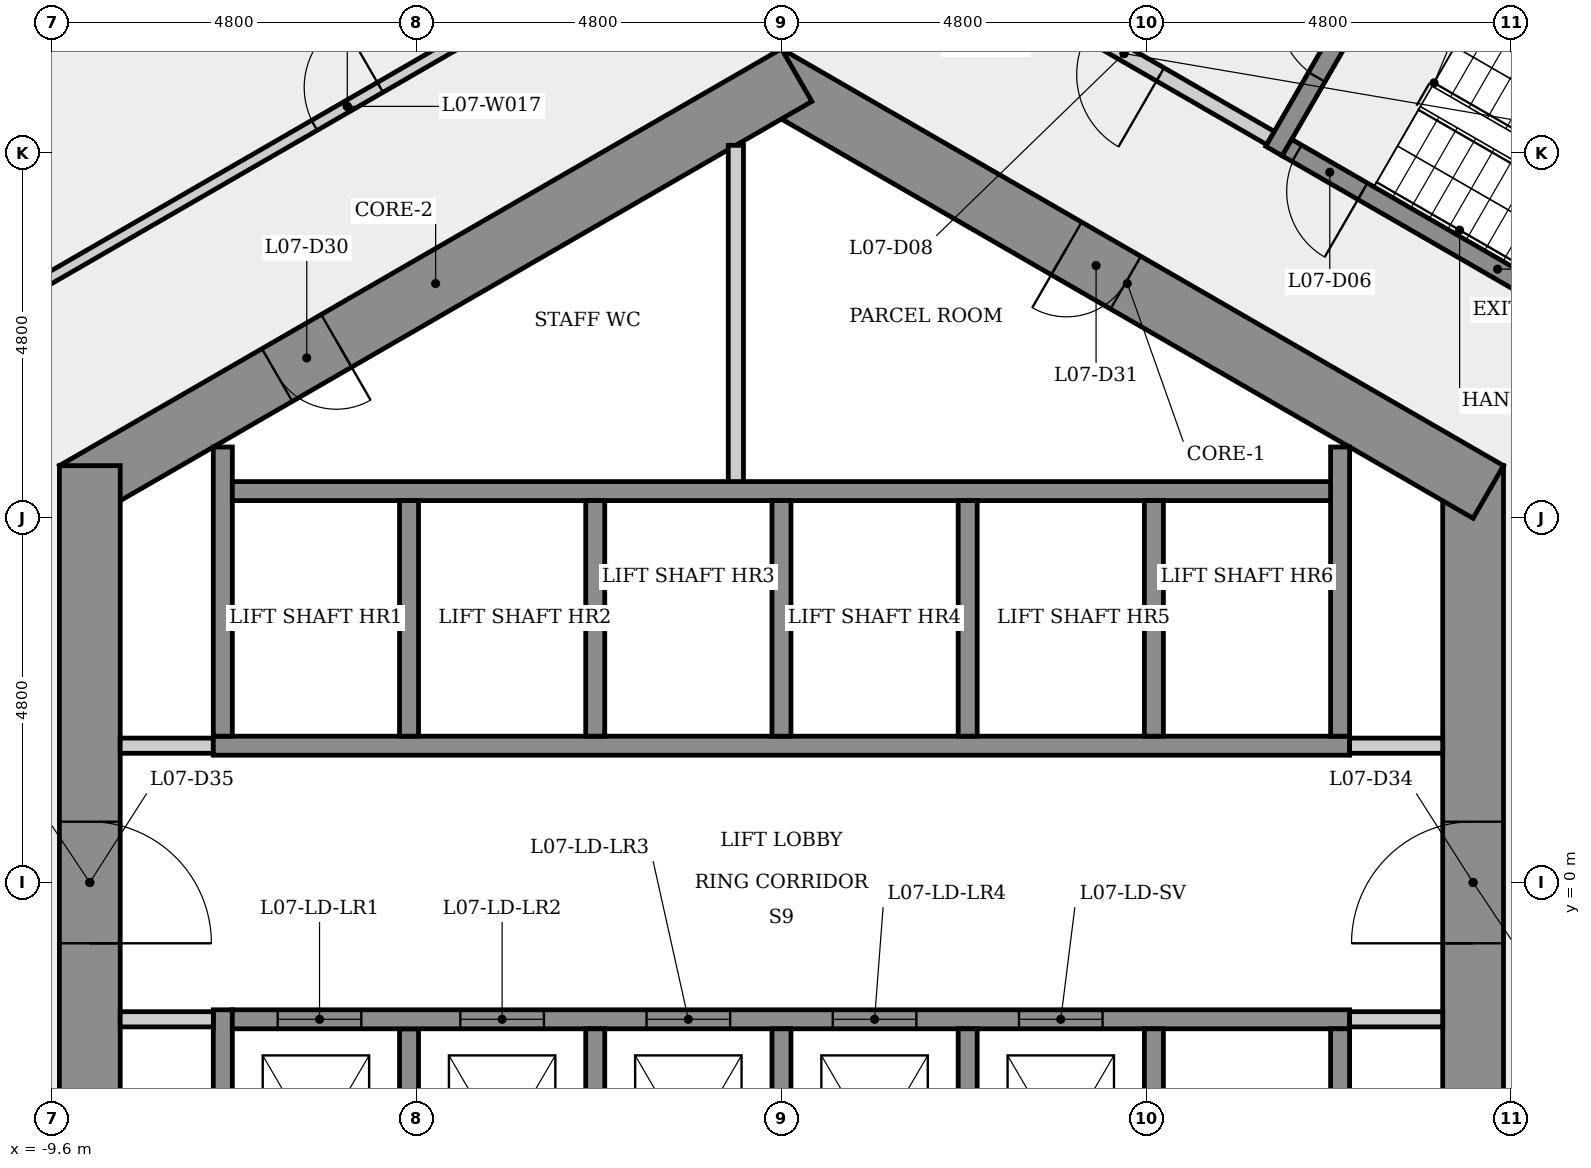
"""IFC4 building model, lengths in metres.
Left out: names, types, materials, properties, quantities, classifications, styles, units other than length and angle.
Written with IfcOpenShell. Run it as: python <this file> out.ifc"""

import sys

from ifc_helpers import new_model, si_unit, direction, frame, frame_2d, origin, place, context, subcontext, project, spatial, rectangle, extrude, element, fill, save


model = new_model("IFC4")
c1 = context("Model", 3, precision=1e-05, world=origin(), true_north=direction((0.0, 1.0)))
c2 = subcontext(c1, "Body", "Model", "MODEL_VIEW")
j1 = project(units=[si_unit("LENGTHUNIT", "METRE"), si_unit("PLANEANGLEUNIT", "RADIAN")], contexts=[c1])
p1 = place(None, origin())
s1 = spatial("IfcSite", under=j1, at=p1, CompositionType="ELEMENT")
p2 = place(p1, origin())
s2 = spatial("IfcBuilding", under=s1, at=p2, CompositionType="ELEMENT")
p3 = place(p2, frame((0.0, 0.0, 32.3)))
s3 = spatial("IfcBuildingStorey", under=s2, at=p3, CompositionType="ELEMENT", Elevation=32.3)
p4 = place(p3, frame((9.1, -5.485, 0.0), z_axis=(0.0, 0.0, 1.0), x_axis=(0.0, 1.0, 0.0)))
e1 = element("IfcWall", 1, at=p4, inside=s3, PredefinedType="SHEAR", context=c2, shape_type="SweptSolid", body=[
    extrude(rectangle(XDim=10.97, YDim=0.8, at=frame_2d((5.485, 0.0))), origin(), (0.0, 0.0, 1.0), 3.4),
])
p5 = place(p4, frame((4.685, 0.0, 0.0)))
e2 = element("IfcOpeningElement", 2, at=p5, cuts=e1, PredefinedType="OPENING", context=c2, shape_type="SweptSolid", body=[
    extrude(rectangle(XDim=1.6, YDim=2.1, at=frame_2d((0.8, 1.05))), frame((0.0, 0.41, 0.0), z_axis=(0.0, -1.0, 0.0), x_axis=(1.0, 0.0, 0.0)), (0.0, 0.0, 1.0), 0.82),
])
p6 = place(p3, frame((9.3, 5.138, 0.0), z_axis=(0.0, 0.0, 1.0), x_axis=(-0.866023993627, 0.500002442456, 0.0)))
e3 = element("IfcWall", 3, at=p6, inside=s3, PredefinedType="SHEAR", context=c2, shape_type="SweptSolid", body=[
    extrude(rectangle(XDim=10.97, YDim=0.8, at=frame_2d((5.485, 0.0))), origin(), (0.0, 0.0, 1.0), 3.4),
])
p7 = place(p6, frame((5.509, 0.0, 0.0)))
e4 = element("IfcOpeningElement", 4, at=p7, cuts=e3, PredefinedType="OPENING", context=c2, shape_type="SweptSolid", body=[
    extrude(rectangle(XDim=0.9, YDim=2.1, at=frame_2d((0.45, 1.05))), frame((0.0, 0.41, 0.0), z_axis=(0.0, -1.0, 0.0), x_axis=(1.0, 0.0, 0.0)), (0.0, 0.0, 1.0), 0.82),
])
p8 = place(p3, frame((0.2, 10.623, 0.0), z_axis=(0.0, 0.0, 1.0), x_axis=(-0.866023993627, -0.500002442456, 0.0)))
e5 = element("IfcWall", 5, at=p8, inside=s3, PredefinedType="SHEAR", context=c2, shape_type="SweptSolid", body=[
    extrude(rectangle(XDim=10.97, YDim=0.8, at=frame_2d((5.485, 0.0))), origin(), (0.0, 0.0, 1.0), 3.4),
])
p9 = place(p8, frame((6.993, 0.0, 0.0)))
e6 = element("IfcOpeningElement", 6, at=p9, cuts=e5, PredefinedType="OPENING", context=c2, shape_type="SweptSolid", body=[
    extrude(rectangle(XDim=0.9, YDim=2.1, at=frame_2d((0.45, 1.05))), frame((0.0, 0.41, 0.0), z_axis=(0.0, -1.0, 0.0), x_axis=(1.0, 0.0, 0.0)), (0.0, 0.0, 1.0), 0.82),
])
p10 = place(p3, frame((-9.1, 5.485, 0.0), z_axis=(0.0, 0.0, 1.0), x_axis=(0.0, -1.0, 0.0)))
e7 = element("IfcWall", 7, at=p10, inside=s3, PredefinedType="SHEAR", context=c2, shape_type="SweptSolid", body=[
    extrude(rectangle(XDim=10.97, YDim=0.8, at=frame_2d((5.485, 0.0))), origin(), (0.0, 0.0, 1.0), 3.4),
])
p11 = place(p10, frame((4.685, 0.0, 0.0)))
e8 = element("IfcOpeningElement", 8, at=p11, cuts=e7, PredefinedType="OPENING", context=c2, shape_type="SweptSolid", body=[
    extrude(rectangle(XDim=1.6, YDim=2.1, at=frame_2d((0.8, 1.05))), frame((0.0, 0.41, 0.0), z_axis=(0.0, -1.0, 0.0), x_axis=(1.0, 0.0, 0.0)), (0.0, 0.0, 1.0), 0.82),
])
p12 = place(p3, frame((-10.825, 7.26, 0.0), z_axis=(0.0, 0.0, 1.0), x_axis=(0.866025463095, 0.499999897272, 0.0)))
e9 = element("IfcWall", 9, at=p12, inside=s3, PredefinedType="PARTITIONING", context=c2, shape_type="SweptSolid", body=[
    extrude(rectangle(XDim=11.807, YDim=0.15, at=frame_2d((5.903, 0.0))), origin(), (0.0, 0.0, 1.0), 3.05),
])
p13 = place(p12, frame((5.403, 0.0, 0.0)))
e10 = element("IfcOpeningElement", 10, at=p13, cuts=e9, PredefinedType="OPENING", context=c2, shape_type="SweptSolid", body=[
    extrude(rectangle(XDim=1.0, YDim=2.1, at=frame_2d((0.5, 1.05))), frame((0.0, 0.085, 0.0), z_axis=(0.0, -1.0, 0.0), x_axis=(1.0, 0.0, 0.0)), (0.0, 0.0, 1.0), 0.17),
])
p14 = place(p3, frame((-8.7, 1.8, 0.0), z_axis=(0.0, 0.0, 1.0), x_axis=(1.0, 0.0, 0.0)))
e11 = element("IfcWall", 11, at=p14, inside=s3, PredefinedType="PARTITIONING", context=c2, shape_type="SweptSolid", body=[
    extrude(rectangle(XDim=1.225, YDim=0.2, at=frame_2d((0.613, 0.0))), origin(), (0.0, 0.0, 1.0), 3.05),
])
p15 = place(p3, frame((-7.475, 1.8, 0.0), z_axis=(0.0, 0.0, 1.0), x_axis=(1.0, 0.0, 0.0)))
e12 = element("IfcWall", 12, at=p15, inside=s3, PredefinedType="SHEAR", context=c2, shape_type="SweptSolid", body=[
    extrude(rectangle(XDim=14.95, YDim=0.25, at=frame_2d((7.475, 0.0))), origin(), (0.0, 0.0, 1.0), 3.05),
])
p16 = place(p3, frame((-7.35, -5.73, 0.0), z_axis=(0.0, 0.0, 1.0), x_axis=(0.0, 1.0, 0.0)))
e13 = element("IfcWall", 13, at=p16, inside=s3, PredefinedType="SHEAR", context=c2, shape_type="SweptSolid", body=[
    extrude(rectangle(XDim=4.055, YDim=0.25, at=frame_2d((2.028, 0.0))), origin(), (0.0, 0.0, 1.0), 3.05),
])
p17 = place(p3, frame((-7.35, 1.925, 0.0), z_axis=(0.0, 0.0, 1.0), x_axis=(0.0, 1.0, 0.0)))
e14 = element("IfcWall", 14, at=p17, inside=s3, PredefinedType="SHEAR", context=c2, shape_type="SweptSolid", body=[
    extrude(rectangle(XDim=3.805, YDim=0.25, at=frame_2d((1.903, 0.0))), origin(), (0.0, 0.0, 1.0), 3.05),
])
p18 = place(p3, frame((-7.225, 5.15, 0.0), z_axis=(0.0, 0.0, 1.0), x_axis=(1.0, 0.0, 0.0)))
e15 = element("IfcWall", 15, at=p18, inside=s3, PredefinedType="SHEAR", context=c2, shape_type="SweptSolid", body=[
    extrude(rectangle(XDim=14.7, YDim=0.25, at=frame_2d((7.35, 0.0))), origin(), (0.0, 0.0, 1.0), 3.05),
])
p19 = place(p3, frame((-7.475, -1.8, 0.0), z_axis=(0.0, 0.0, 1.0), x_axis=(-1.0, 0.0, 0.0)))
e16 = element("IfcWall", 16, at=p19, inside=s3, PredefinedType="PARTITIONING", context=c2, shape_type="SweptSolid", body=[
    extrude(rectangle(XDim=1.225, YDim=0.2, at=frame_2d((0.613, 0.0))), origin(), (0.0, 0.0, 1.0), 3.05),
])
for number, where, z_axis, x_axis in (
    (17, (-4.9, -1.925, 0.0), (0.0, 0.0, 1.0), (0.0, -1.0, 0.0)),
    (18, (-4.9, 5.025, 0.0), (0.0, 0.0, 1.0), (0.0, -1.0, 0.0)),
):
    element("IfcWall", number, at=place(p3, frame(where, z_axis=z_axis, x_axis=x_axis)), inside=s3, PredefinedType="SHEAR", context=c2, shape_type="SweptSolid", body=[
        extrude(rectangle(XDim=3.1, YDim=0.25, at=frame_2d((1.55, 0.0))), origin(), (0.0, 0.0, 1.0), 3.4),
    ])
p20 = place(p3, frame((-7.225, -1.8, 0.0), z_axis=(0.0, 0.0, 1.0), x_axis=(1.0, 0.0, 0.0)))
e19 = element("IfcWall", 19, at=p20, inside=s3, PredefinedType="SHEAR", context=c2, shape_type="SweptSolid", body=[
    extrude(rectangle(XDim=14.7, YDim=0.25, at=frame_2d((7.35, 0.0))), origin(), (0.0, 0.0, 1.0), 3.05),
])
p21 = place(p20, frame((0.597, 0.0, 0.0)))
e20 = element("IfcOpeningElement", 20, at=p21, cuts=e19, PredefinedType="OPENING", context=c2, shape_type="SweptSolid", body=[
    extrude(rectangle(XDim=1.1, YDim=2.1, at=frame_2d((0.55, 1.05))), frame((0.0, 0.135, 0.0), z_axis=(0.0, -1.0, 0.0), x_axis=(1.0, 0.0, 0.0)), (0.0, 0.0, 1.0), 0.27),
])
p22 = place(p20, frame((3.0, 0.0, 0.0)))
e21 = element("IfcOpeningElement", 21, at=p22, cuts=e19, PredefinedType="OPENING", context=c2, shape_type="SweptSolid", body=[
    extrude(rectangle(XDim=1.1, YDim=2.1, at=frame_2d((0.55, 1.05))), frame((0.0, 0.135, 0.0), z_axis=(0.0, -1.0, 0.0), x_axis=(1.0, 0.0, 0.0)), (0.0, 0.0, 1.0), 0.27),
])
p23 = place(p20, frame((5.45, 0.0, 0.0)))
e22 = element("IfcOpeningElement", 22, at=p23, cuts=e19, PredefinedType="OPENING", context=c2, shape_type="SweptSolid", body=[
    extrude(rectangle(XDim=1.1, YDim=2.1, at=frame_2d((0.55, 1.05))), frame((0.0, 0.135, 0.0), z_axis=(0.0, -1.0, 0.0), x_axis=(1.0, 0.0, 0.0)), (0.0, 0.0, 1.0), 0.27),
])
p24 = place(p20, frame((7.9, 0.0, 0.0)))
e23 = element("IfcOpeningElement", 23, at=p24, cuts=e19, PredefinedType="OPENING", context=c2, shape_type="SweptSolid", body=[
    extrude(rectangle(XDim=1.1, YDim=2.1, at=frame_2d((0.55, 1.05))), frame((0.0, 0.135, 0.0), z_axis=(0.0, -1.0, 0.0), x_axis=(1.0, 0.0, 0.0)), (0.0, 0.0, 1.0), 0.27),
])
p25 = place(p20, frame((10.35, 0.0, 0.0)))
e24 = element("IfcOpeningElement", 24, at=p25, cuts=e19, PredefinedType="OPENING", context=c2, shape_type="SweptSolid", body=[
    extrude(rectangle(XDim=1.1, YDim=2.1, at=frame_2d((0.55, 1.05))), frame((0.0, 0.135, 0.0), z_axis=(0.0, -1.0, 0.0), x_axis=(1.0, 0.0, 0.0)), (0.0, 0.0, 1.0), 0.27),
])
for number, where, z_axis, x_axis in (
    (25, (-2.45, -1.925, 0.0), (0.0, 0.0, 1.0), (0.0, -1.0, 0.0)),
    (26, (-2.45, 5.025, 0.0), (0.0, 0.0, 1.0), (0.0, -1.0, 0.0)),
):
    element("IfcWall", number, at=place(p3, frame(where, z_axis=z_axis, x_axis=x_axis)), inside=s3, PredefinedType="SHEAR", context=c2, shape_type="SweptSolid", body=[
        extrude(rectangle(XDim=3.1, YDim=0.25, at=frame_2d((1.55, 0.0))), origin(), (0.0, 0.0, 1.0), 3.4),
    ])
p26 = place(p3, frame((-0.6, 9.699, 0.0), z_axis=(0.0, 0.0, 1.0), x_axis=(0.0, -1.0, 0.0)))
e27 = element("IfcWall", 27, at=p26, inside=s3, PredefinedType="PARTITIONING", context=c2, shape_type="SweptSolid", body=[
    extrude(rectangle(XDim=4.425, YDim=0.2, at=frame_2d((2.212, 0.0))), origin(), (0.0, 0.0, 1.0), 3.05),
])
for number, where, z_axis, x_axis in (
    (28, (0.0, -1.925, 0.0), (0.0, 0.0, 1.0), (0.0, -1.0, 0.0)),
    (29, (0.0, 5.025, 0.0), (0.0, 0.0, 1.0), (0.0, -1.0, 0.0)),
    (30, (2.45, -1.925, 0.0), (0.0, 0.0, 1.0), (0.0, -1.0, 0.0)),
    (31, (2.45, 5.025, 0.0), (0.0, 0.0, 1.0), (0.0, -1.0, 0.0)),
    (32, (4.9, -1.925, 0.0), (0.0, 0.0, 1.0), (0.0, -1.0, 0.0)),
    (33, (4.9, 5.025, 0.0), (0.0, 0.0, 1.0), (0.0, -1.0, 0.0)),
):
    element("IfcWall", number, at=place(p3, frame(where, z_axis=z_axis, x_axis=x_axis)), inside=s3, PredefinedType="SHEAR", context=c2, shape_type="SweptSolid", body=[
        extrude(rectangle(XDim=3.1, YDim=0.25, at=frame_2d((1.55, 0.0))), origin(), (0.0, 0.0, 1.0), 3.4),
    ])
p27 = place(p3, frame((6.435, 9.795, 0.0), z_axis=(0.0, 0.0, 1.0), x_axis=(-0.866012907634, 0.500021643343, 0.0)))
e34 = element("IfcWall", 34, at=p27, inside=s3, PredefinedType="PARTITIONING", context=c2, shape_type="SweptSolid", body=[
    extrude(rectangle(XDim=4.45, YDim=0.2, at=frame_2d((2.225, 0.0))), origin(), (0.0, 0.0, 1.0), 3.05),
])
p28 = place(p27, frame((1.675, 0.0, 0.0)))
e35 = element("IfcOpeningElement", 35, at=p28, cuts=e34, PredefinedType="OPENING", context=c2, shape_type="SweptSolid", body=[
    extrude(rectangle(XDim=1.1, YDim=2.1, at=frame_2d((0.55, 1.05))), frame((0.0, 0.11, 0.0), z_axis=(0.0, -1.0, 0.0), x_axis=(1.0, 0.0, 0.0)), (0.0, 0.0, 1.0), 0.22),
])
p29 = place(p3, frame((6.48, 9.624, 0.0), z_axis=(0.0, 0.0, 1.0), x_axis=(0.500017246033, 0.866015446554, 0.0)))
e36 = element("IfcWall", 36, at=p29, inside=s3, PredefinedType="SHEAR", context=c2, shape_type="SweptSolid", body=[
    extrude(rectangle(XDim=3.25, YDim=0.25, at=frame_2d((1.625, 0.0))), origin(), (0.0, 0.0, 1.0), 3.05),
])
p30 = place(p29, frame((1.125, 0.0, 0.0)))
e37 = element("IfcOpeningElement", 37, at=p30, cuts=e36, PredefinedType="OPENING", context=c2, shape_type="SweptSolid", body=[
    extrude(rectangle(XDim=1.0, YDim=2.1, at=frame_2d((0.5, 1.05))), frame((0.0, 0.135, 0.0), z_axis=(0.0, -1.0, 0.0), x_axis=(1.0, 0.0, 0.0)), (0.0, 0.0, 1.0), 0.27),
])
p31 = place(p3, frame((7.475, 1.8, 0.0), z_axis=(0.0, 0.0, 1.0), x_axis=(1.0, 0.0, 0.0)))
e38 = element("IfcWall", 38, at=p31, inside=s3, PredefinedType="PARTITIONING", context=c2, shape_type="SweptSolid", body=[
    extrude(rectangle(XDim=1.225, YDim=0.2, at=frame_2d((0.613, 0.0))), origin(), (0.0, 0.0, 1.0), 3.05),
])
for number, where, z_axis, x_axis in (
    (39, (7.35, -1.925, 0.0), (0.0, 0.0, 1.0), (0.0, -1.0, 0.0)),
    (40, (7.35, 5.73, 0.0), (0.0, 0.0, 1.0), (0.0, -1.0, 0.0)),
):
    element("IfcWall", number, at=place(p3, frame(where, z_axis=z_axis, x_axis=x_axis)), inside=s3, PredefinedType="SHEAR", context=c2, shape_type="SweptSolid", body=[
        extrude(rectangle(XDim=3.805, YDim=0.25, at=frame_2d((1.903, 0.0))), origin(), (0.0, 0.0, 1.0), 3.05),
    ])
p32 = place(p3, frame((8.151, 12.268, 0.0), z_axis=(0.0, 0.0, 1.0), x_axis=(0.866025499775, -0.499999833739, 0.0)))
e41 = element("IfcWall", 41, at=p32, inside=s3, PredefinedType="SHEAR", context=c2, shape_type="SweptSolid", body=[
    extrude(rectangle(XDim=6.4, YDim=0.25, at=frame_2d((3.2, 0.0))), origin(), (0.0, 0.0, 1.0), 3.05),
])
p33 = place(p3, frame((8.7, -1.8, 0.0), z_axis=(0.0, 0.0, 1.0), x_axis=(-1.0, 0.0, 0.0)))
e42 = element("IfcWall", 42, at=p33, inside=s3, PredefinedType="PARTITIONING", context=c2, shape_type="SweptSolid", body=[
    extrude(rectangle(XDim=1.225, YDim=0.2, at=frame_2d((0.613, 0.0))), origin(), (0.0, 0.0, 1.0), 3.05),
])
p34 = place(p3, frame((12.194, 6.47, 0.0), z_axis=(0.0, 0.0, 1.0), x_axis=(-0.866025499775, 0.499999833739, 0.0)))
e43 = element("IfcWall", 43, at=p34, inside=s3, PredefinedType="SHEAR", context=c2, shape_type="SweptSolid", body=[
    extrude(rectangle(XDim=6.4, YDim=0.25, at=frame_2d((3.2, 0.0))), origin(), (0.0, 0.0, 1.0), 3.05),
])
p35 = place(p34, frame((5.25, 0.0, 0.0)))
e44 = element("IfcOpeningElement", 44, at=p35, cuts=e43, PredefinedType="OPENING", context=c2, shape_type="SweptSolid", body=[
    extrude(rectangle(XDim=1.0, YDim=2.1, at=frame_2d((0.5, 1.05))), frame((0.0, 0.135, 0.0), z_axis=(0.0, -1.0, 0.0), x_axis=(1.0, 0.0, 0.0)), (0.0, 0.0, 1.0), 0.27),
])
p36 = place(p21, origin())
e45 = element("IfcDoor", 45, at=p36, inside=s3, OperationType="SLIDING_TO_LEFT", PredefinedType="DOOR", context=c2, shape_type="SweptSolid", body=[
    extrude(rectangle(XDim=1.1, YDim=2.1, at=frame_2d((0.55, 1.05))), frame((0.0, 0.025, 0.0), z_axis=(0.0, -1.0, 0.0), x_axis=(1.0, 0.0, 0.0)), (0.0, 0.0, 1.0), 0.05),
])
fill(e20, e45)
p37 = place(p22, origin())
e46 = element("IfcDoor", 46, at=p37, inside=s3, OperationType="SLIDING_TO_LEFT", PredefinedType="DOOR", context=c2, shape_type="SweptSolid", body=[
    extrude(rectangle(XDim=1.1, YDim=2.1, at=frame_2d((0.55, 1.05))), frame((0.0, 0.025, 0.0), z_axis=(0.0, -1.0, 0.0), x_axis=(1.0, 0.0, 0.0)), (0.0, 0.0, 1.0), 0.05),
])
fill(e21, e46)
p38 = place(p23, origin())
e47 = element("IfcDoor", 47, at=p38, inside=s3, OperationType="SLIDING_TO_LEFT", PredefinedType="DOOR", context=c2, shape_type="SweptSolid", body=[
    extrude(rectangle(XDim=1.1, YDim=2.1, at=frame_2d((0.55, 1.05))), frame((0.0, 0.025, 0.0), z_axis=(0.0, -1.0, 0.0), x_axis=(1.0, 0.0, 0.0)), (0.0, 0.0, 1.0), 0.05),
])
fill(e22, e47)
p39 = place(p24, origin())
e48 = element("IfcDoor", 48, at=p39, inside=s3, OperationType="SLIDING_TO_LEFT", PredefinedType="DOOR", context=c2, shape_type="SweptSolid", body=[
    extrude(rectangle(XDim=1.1, YDim=2.1, at=frame_2d((0.55, 1.05))), frame((0.0, 0.025, 0.0), z_axis=(0.0, -1.0, 0.0), x_axis=(1.0, 0.0, 0.0)), (0.0, 0.0, 1.0), 0.05),
])
fill(e23, e48)
p40 = place(p25, origin())
e49 = element("IfcDoor", 49, at=p40, inside=s3, OperationType="SLIDING_TO_LEFT", PredefinedType="DOOR", context=c2, shape_type="SweptSolid", body=[
    extrude(rectangle(XDim=1.1, YDim=2.1, at=frame_2d((0.55, 1.05))), frame((0.0, 0.025, 0.0), z_axis=(0.0, -1.0, 0.0), x_axis=(1.0, 0.0, 0.0)), (0.0, 0.0, 1.0), 0.05),
])
fill(e24, e49)
p41 = place(p35, origin())
e50 = element("IfcDoor", 50, at=p41, inside=s3, OperationType="SINGLE_SWING_LEFT", PredefinedType="DOOR", context=c2, shape_type="SweptSolid", body=[
    extrude(rectangle(XDim=1.0, YDim=2.1, at=frame_2d((0.5, 1.05))), frame((0.0, 0.025, 0.0), z_axis=(0.0, -1.0, 0.0), x_axis=(1.0, 0.0, 0.0)), (0.0, 0.0, 1.0), 0.05),
])
fill(e44, e50)
p42 = place(p30, origin())
e51 = element("IfcDoor", 51, at=p42, inside=s3, OperationType="SINGLE_SWING_RIGHT", PredefinedType="DOOR", context=c2, shape_type="SweptSolid", body=[
    extrude(rectangle(XDim=1.0, YDim=2.1, at=frame_2d((0.5, 1.05))), frame((0.0, 0.025, 0.0), z_axis=(0.0, -1.0, 0.0), x_axis=(1.0, 0.0, 0.0)), (0.0, 0.0, 1.0), 0.05),
])
fill(e37, e51)
p43 = place(p28, origin())
e52 = element("IfcDoor", 52, at=p43, inside=s3, OperationType="SINGLE_SWING_LEFT", PredefinedType="DOOR", context=c2, shape_type="SweptSolid", body=[
    extrude(rectangle(XDim=1.1, YDim=2.1, at=frame_2d((0.55, 1.05))), frame((0.0, 0.025, 0.0), z_axis=(0.0, -1.0, 0.0), x_axis=(1.0, 0.0, 0.0)), (0.0, 0.0, 1.0), 0.05),
])
fill(e35, e52)
p44 = place(p13, origin())
e53 = element("IfcDoor", 53, at=p44, inside=s3, OperationType="SINGLE_SWING_RIGHT", PredefinedType="DOOR", context=c2, shape_type="SweptSolid", body=[
    extrude(rectangle(XDim=1.0, YDim=2.1, at=frame_2d((0.5, 1.05))), frame((0.0, 0.025, 0.0), z_axis=(0.0, -1.0, 0.0), x_axis=(1.0, 0.0, 0.0)), (0.0, 0.0, 1.0), 0.05),
])
fill(e10, e53)
p45 = place(p9, origin())
e54 = element("IfcDoor", 54, at=p45, inside=s3, OperationType="SINGLE_SWING_LEFT", PredefinedType="DOOR", context=c2, shape_type="SweptSolid", body=[
    extrude(rectangle(XDim=0.9, YDim=2.1, at=frame_2d((0.45, 1.05))), frame((0.0, 0.025, 0.0), z_axis=(0.0, -1.0, 0.0), x_axis=(1.0, 0.0, 0.0)), (0.0, 0.0, 1.0), 0.05),
])
fill(e6, e54)
p46 = place(p7, origin())
e55 = element("IfcDoor", 55, at=p46, inside=s3, OperationType="SINGLE_SWING_RIGHT", PredefinedType="DOOR", context=c2, shape_type="SweptSolid", body=[
    extrude(rectangle(XDim=0.9, YDim=2.1, at=frame_2d((0.45, 1.05))), frame((0.0, 0.025, 0.0), z_axis=(0.0, -1.0, 0.0), x_axis=(1.0, 0.0, 0.0)), (0.0, 0.0, 1.0), 0.05),
])
fill(e4, e55)
p47 = place(p5, origin())
e56 = element("IfcDoor", 56, at=p47, inside=s3, OperationType="SINGLE_SWING_LEFT", PredefinedType="DOOR", context=c2, shape_type="SweptSolid", body=[
    extrude(rectangle(XDim=1.6, YDim=2.1, at=frame_2d((0.8, 1.05))), frame((0.0, 0.025, 0.0), z_axis=(0.0, -1.0, 0.0), x_axis=(1.0, 0.0, 0.0)), (0.0, 0.0, 1.0), 0.05),
])
fill(e2, e56)
p48 = place(p11, origin())
e57 = element("IfcDoor", 57, at=p48, inside=s3, OperationType="SINGLE_SWING_RIGHT", PredefinedType="DOOR", context=c2, shape_type="SweptSolid", body=[
    extrude(rectangle(XDim=1.6, YDim=2.1, at=frame_2d((0.8, 1.05))), frame((0.0, 0.025, 0.0), z_axis=(0.0, -1.0, 0.0), x_axis=(1.0, 0.0, 0.0)), (0.0, 0.0, 1.0), 0.05),
])
fill(e8, e57)
save(model, sys.argv[1])
